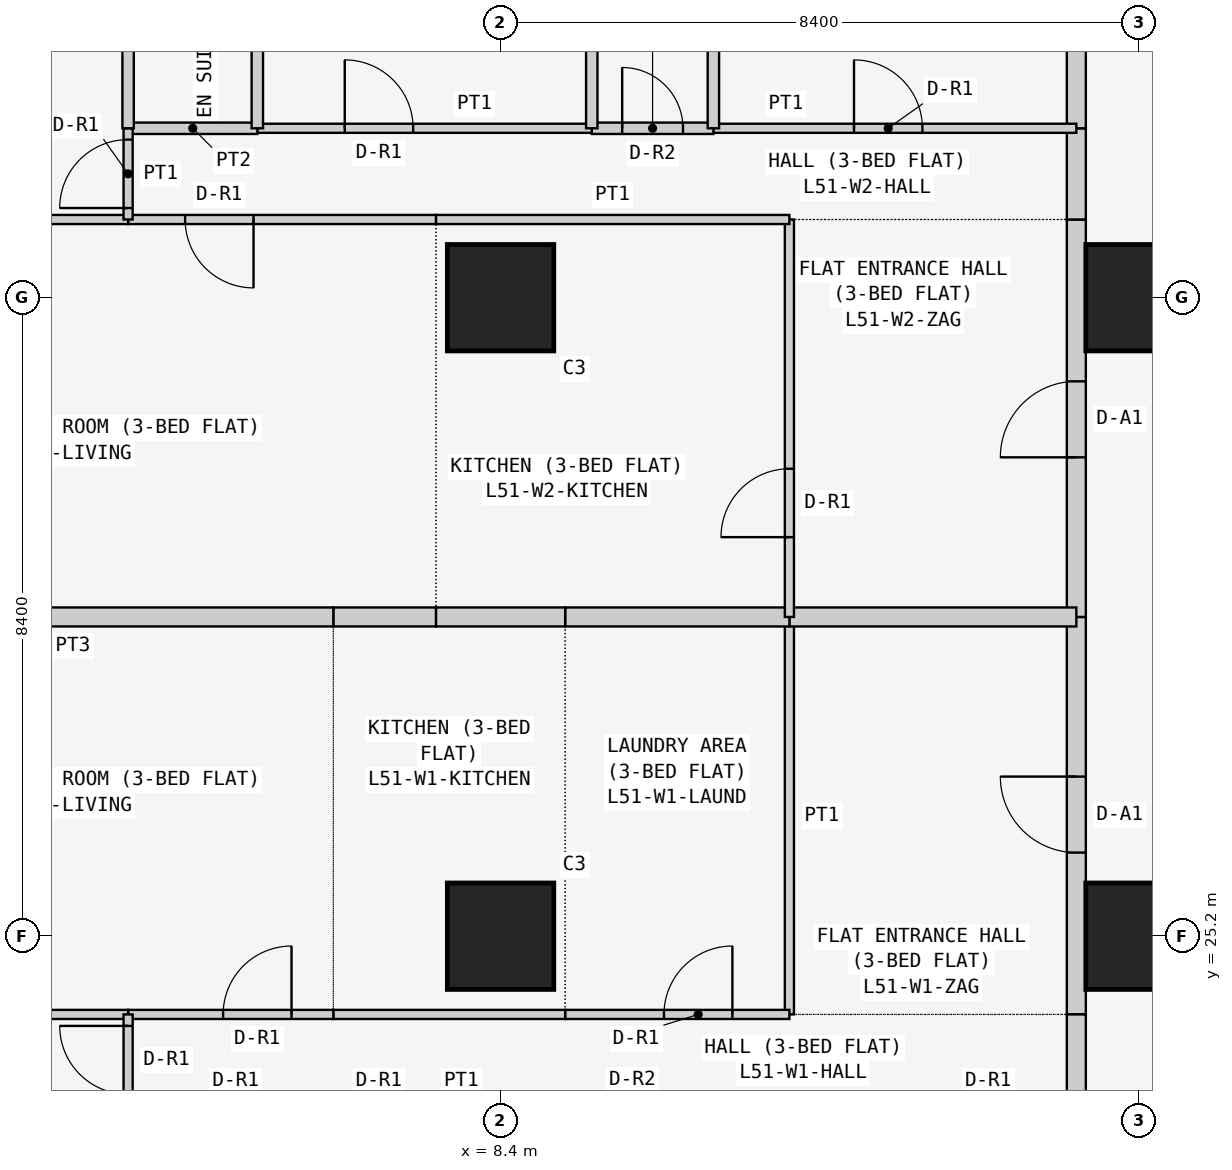
"""IFC4 building model, lengths in metres.
Left out: names, types, materials, properties, quantities, classifications, styles, units other than length and angle.
Written with IfcOpenShell. Run it as: python <this file> out.ifc"""

import sys

from ifc_helpers import new_model, si_unit, direction, frame, frame_2d, origin, origin_2d, place, context, subcontext, project, spatial, rectangle, extrude, element, fill, save


model = new_model("IFC4")
c1 = context("Model", 3, precision=1e-05, world=origin(), true_north=direction((0.0, 1.0)))
c2 = subcontext(c1, "Body", "Model", "MODEL_VIEW")
j1 = project(units=[si_unit("LENGTHUNIT", "METRE"), si_unit("PLANEANGLEUNIT", "RADIAN")], contexts=[c1])
p1 = place(None, origin())
s1 = spatial("IfcSite", under=j1, at=p1, CompositionType="ELEMENT")
p2 = place(p1, origin())
s2 = spatial("IfcBuilding", under=s1, at=p2, CompositionType="ELEMENT")
p3 = place(p2, frame((0.0, 0.0, 197.7)))
s3 = spatial("IfcBuildingStorey", under=s2, at=p3, CompositionType="ELEMENT", Elevation=197.7)
for number, where, z_axis, x_axis in (
    (1, (8.4, 25.2, 0.0), (0.0, 0.0, 1.0), (1.0, 0.0, 0.0)),
    (2, (8.4, 33.6, 0.0), (0.0, 0.0, 1.0), (1.0, 0.0, 0.0)),
    (3, (16.8, 25.2, 0.0), (0.0, 0.0, 1.0), (1.0, 0.0, 0.0)),
    (4, (16.8, 33.6, 0.0), (0.0, 0.0, 1.0), (1.0, 0.0, 0.0)),
):
    element("IfcColumn", number, at=place(p3, frame(where, z_axis=z_axis, x_axis=x_axis)), inside=s3, PredefinedType="COLUMN", context=c2, shape_type="SweptSolid", body=[
        extrude(rectangle(XDim=1.4, YDim=1.4, at=origin_2d()), origin(), (0.0, 0.0, 1.0), 3.6),
    ])
p4 = place(p3, frame((15.975, 24.171, 0.0), z_axis=(0.0, 0.0, 1.0), x_axis=(0.0, 1.0, 0.0)))
e5 = element("IfcWall", 5, at=p4, inside=s3, PredefinedType="PARTITIONING", context=c2, shape_type="SweptSolid", body=[
    extrude(rectangle(XDim=5.229, YDim=0.25, at=frame_2d((2.615, 0.0))), origin(), (0.0, 0.0, 1.0), 3.45),
])
p5 = place(p4, frame((2.129, 0.0, 0.0)))
e6 = element("IfcOpeningElement", 6, at=p5, cuts=e5, PredefinedType="OPENING", context=c2, shape_type="SweptSolid", body=[
    extrude(rectangle(XDim=1.0, YDim=2.1, at=frame_2d((0.5, 1.05))), frame((0.0, 0.135, 0.0), z_axis=(0.0, -1.0, 0.0), x_axis=(1.0, 0.0, 0.0)), (0.0, 0.0, 1.0), 0.27),
])
p6 = place(p3, frame((15.975, 22.971, 0.0), z_axis=(0.0, 0.0, 1.0), x_axis=(0.0, 1.0, 0.0)))
e7 = element("IfcWall", 7, at=p6, inside=s3, PredefinedType="PARTITIONING", context=c2, shape_type="SweptSolid", body=[
    extrude(rectangle(XDim=1.2, YDim=0.25, at=frame_2d((0.6, 0.0))), origin(), (0.0, 0.0, 1.0), 3.45),
])
p7 = place(p3, frame((15.975, 29.4, 0.0), z_axis=(0.0, 0.0, 1.0), x_axis=(0.0, 1.0, 0.0)))
e8 = element("IfcWall", 8, at=p7, inside=s3, PredefinedType="PARTITIONING", context=c2, shape_type="SweptSolid", body=[
    extrude(rectangle(XDim=5.229, YDim=0.25, at=frame_2d((2.615, 0.0))), origin(), (0.0, 0.0, 1.0), 3.45),
])
p8 = place(p7, frame((2.1, 0.0, 0.0)))
e9 = element("IfcOpeningElement", 9, at=p8, cuts=e8, PredefinedType="OPENING", context=c2, shape_type="SweptSolid", body=[
    extrude(rectangle(XDim=1.0, YDim=2.1, at=frame_2d((0.5, 1.05))), frame((0.0, 0.135, 0.0), z_axis=(0.0, -1.0, 0.0), x_axis=(1.0, 0.0, 0.0)), (0.0, 0.0, 1.0), 0.27),
])
p9 = place(p3, frame((15.975, 34.629, 0.0), z_axis=(0.0, 0.0, 1.0), x_axis=(0.0, 1.0, 0.0)))
e10 = element("IfcWall", 10, at=p9, inside=s3, PredefinedType="PARTITIONING", context=c2, shape_type="SweptSolid", body=[
    extrude(rectangle(XDim=1.2, YDim=0.25, at=frame_2d((0.6, 0.0))), origin(), (0.0, 0.0, 1.0), 3.45),
])
p10 = place(p3, frame((15.975, 35.829, 0.0), z_axis=(0.0, 0.0, 1.0), x_axis=(0.0, 1.0, 0.0)))
e11 = element("IfcWall", 11, at=p10, inside=s3, PredefinedType="PARTITIONING", context=c2, shape_type="SweptSolid", body=[
    extrude(rectangle(XDim=6.871, YDim=0.25, at=frame_2d((3.436, 0.0))), origin(), (0.0, 0.0, 1.0), 3.45),
])
p11 = place(p3, frame((12.2, 29.4, 0.0), z_axis=(0.0, 0.0, 1.0), x_axis=(0.0, -1.0, 0.0)))
e12 = element("IfcWall", 12, at=p11, inside=s3, PredefinedType="PARTITIONING", context=c2, shape_type="SweptSolid", body=[
    extrude(rectangle(XDim=5.229, YDim=0.12, at=frame_2d((2.615, 0.0))), origin(), (0.0, 0.0, 1.0), 3.45),
])
p12 = place(p3, frame((15.975, 29.4, 0.0), z_axis=(0.0, 0.0, 1.0), x_axis=(-1.0, 0.0, 0.0)))
e13 = element("IfcWall", 13, at=p12, inside=s3, PredefinedType="PARTITIONING", context=c2, shape_type="SweptSolid", body=[
    extrude(rectangle(XDim=3.775, YDim=0.25, at=frame_2d((1.888, 0.0))), origin(), (0.0, 0.0, 1.0), 3.45),
])
p13 = place(p3, frame((9.25, 24.171, 0.0), z_axis=(0.0, 0.0, 1.0), x_axis=(1.0, 0.0, 0.0)))
e14 = element("IfcWall", 14, at=p13, inside=s3, PredefinedType="PARTITIONING", context=c2, shape_type="SweptSolid", body=[
    extrude(rectangle(XDim=2.95, YDim=0.12, at=frame_2d((1.475, 0.0))), origin(), (0.0, 0.0, 1.0), 3.45),
])
p14 = place(p13, frame((1.3, 0.0, 0.0)))
e15 = element("IfcOpeningElement", 15, at=p14, cuts=e14, PredefinedType="OPENING", context=c2, shape_type="SweptSolid", body=[
    extrude(rectangle(XDim=0.9, YDim=2.1, at=frame_2d((0.45, 1.05))), frame((0.0, 0.07, 0.0), z_axis=(0.0, -1.0, 0.0), x_axis=(1.0, 0.0, 0.0)), (0.0, 0.0, 1.0), 0.14),
])
p15 = place(p3, frame((12.2, 29.4, 0.0), z_axis=(0.0, 0.0, 1.0), x_axis=(-1.0, 0.0, 0.0)))
e16 = element("IfcWall", 16, at=p15, inside=s3, PredefinedType="PARTITIONING", context=c2, shape_type="SweptSolid", body=[
    extrude(rectangle(XDim=2.95, YDim=0.25, at=frame_2d((1.475, 0.0))), origin(), (0.0, 0.0, 1.0), 3.45),
])
p16 = place(p3, frame((6.2, 24.171, 0.0), z_axis=(0.0, 0.0, 1.0), x_axis=(1.0, 0.0, 0.0)))
e17 = element("IfcWall", 17, at=p16, inside=s3, PredefinedType="PARTITIONING", context=c2, shape_type="SweptSolid", body=[
    extrude(rectangle(XDim=3.05, YDim=0.12, at=frame_2d((1.525, 0.0))), origin(), (0.0, 0.0, 1.0), 3.45),
])
p17 = place(p3, frame((9.25, 29.4, 0.0), z_axis=(0.0, 0.0, 1.0), x_axis=(-1.0, 0.0, 0.0)))
e18 = element("IfcWall", 18, at=p17, inside=s3, PredefinedType="PARTITIONING", context=c2, shape_type="SweptSolid", body=[
    extrude(rectangle(XDim=1.7, YDim=0.25, at=frame_2d((0.85, 0.0))), origin(), (0.0, 0.0, 1.0), 3.45),
])
p18 = place(p3, frame((7.55, 29.4, 0.0), z_axis=(0.0, 0.0, 1.0), x_axis=(-1.0, 0.0, 0.0)))
e19 = element("IfcWall", 19, at=p18, inside=s3, PredefinedType="PARTITIONING", context=c2, shape_type="SweptSolid", body=[
    extrude(rectangle(XDim=1.35, YDim=0.25, at=frame_2d((0.675, 0.0))), origin(), (0.0, 0.0, 1.0), 3.45),
])
p19 = place(p3, frame((3.5, 24.171, 0.0), z_axis=(0.0, 0.0, 1.0), x_axis=(1.0, 0.0, 0.0)))
e20 = element("IfcWall", 20, at=p19, inside=s3, PredefinedType="PARTITIONING", context=c2, shape_type="SweptSolid", body=[
    extrude(rectangle(XDim=2.7, YDim=0.12, at=frame_2d((1.35, 0.0))), origin(), (0.0, 0.0, 1.0), 3.45),
])
p20 = place(p19, frame((1.25, 0.0, 0.0)))
e21 = element("IfcOpeningElement", 21, at=p20, cuts=e20, PredefinedType="OPENING", context=c2, shape_type="SweptSolid", body=[
    extrude(rectangle(XDim=0.9, YDim=2.1, at=frame_2d((0.45, 1.05))), frame((0.0, 0.07, 0.0), z_axis=(0.0, -1.0, 0.0), x_axis=(1.0, 0.0, 0.0)), (0.0, 0.0, 1.0), 0.14),
])
p21 = place(p3, frame((-0.65, 24.171, 0.0), z_axis=(0.0, 0.0, 1.0), x_axis=(1.0, 0.0, 0.0)))
e22 = element("IfcWall", 22, at=p21, inside=s3, PredefinedType="PARTITIONING", context=c2, shape_type="SweptSolid", body=[
    extrude(rectangle(XDim=4.15, YDim=0.12, at=frame_2d((2.075, 0.0))), origin(), (0.0, 0.0, 1.0), 3.45),
])
p22 = place(p3, frame((6.2, 29.4, 0.0), z_axis=(0.0, 0.0, 1.0), x_axis=(-1.0, 0.0, 0.0)))
e23 = element("IfcWall", 23, at=p22, inside=s3, PredefinedType="PARTITIONING", context=c2, shape_type="SweptSolid", body=[
    extrude(rectangle(XDim=6.85, YDim=0.25, at=frame_2d((3.425, 0.0))), origin(), (0.0, 0.0, 1.0), 3.45),
])
p23 = place(p3, frame((3.5, 24.171, 0.0), z_axis=(0.0, 0.0, 1.0), x_axis=(0.0, -1.0, 0.0)))
e24 = element("IfcWall", 24, at=p23, inside=s3, PredefinedType="PARTITIONING", context=c2, shape_type="SweptSolid", body=[
    extrude(rectangle(XDim=1.2, YDim=0.12, at=frame_2d((0.6, 0.0))), origin(), (0.0, 0.0, 1.0), 3.45),
])
p24 = place(p23, frame((0.151, 0.0, 0.0)))
e25 = element("IfcOpeningElement", 25, at=p24, cuts=e24, PredefinedType="OPENING", context=c2, shape_type="SweptSolid", body=[
    extrude(rectangle(XDim=0.9, YDim=2.1, at=frame_2d((0.45, 1.05))), frame((0.0, 0.07, 0.0), z_axis=(0.0, -1.0, 0.0), x_axis=(1.0, 0.0, 0.0)), (0.0, 0.0, 1.0), 0.14),
])
p25 = place(p3, frame((12.2, 29.4, 0.0), z_axis=(0.0, 0.0, 1.0), x_axis=(0.0, 1.0, 0.0)))
e26 = element("IfcWall", 26, at=p25, inside=s3, PredefinedType="PARTITIONING", context=c2, shape_type="SweptSolid", body=[
    extrude(rectangle(XDim=5.229, YDim=0.12, at=frame_2d((2.615, 0.0))), origin(), (0.0, 0.0, 1.0), 3.45),
])
p26 = place(p25, frame((1.05, 0.0, 0.0)))
e27 = element("IfcOpeningElement", 27, at=p26, cuts=e26, PredefinedType="OPENING", context=c2, shape_type="SweptSolid", body=[
    extrude(rectangle(XDim=0.9, YDim=2.1, at=frame_2d((0.45, 1.05))), frame((0.0, 0.07, 0.0), z_axis=(0.0, -1.0, 0.0), x_axis=(1.0, 0.0, 0.0)), (0.0, 0.0, 1.0), 0.14),
])
p27 = place(p3, frame((7.55, 34.629, 0.0), z_axis=(0.0, 0.0, 1.0), x_axis=(1.0, 0.0, 0.0)))
e28 = element("IfcWall", 28, at=p27, inside=s3, PredefinedType="PARTITIONING", context=c2, shape_type="SweptSolid", body=[
    extrude(rectangle(XDim=4.65, YDim=0.12, at=frame_2d((2.325, 0.0))), origin(), (0.0, 0.0, 1.0), 3.45),
])
p28 = place(p3, frame((3.5, 34.629, 0.0), z_axis=(0.0, 0.0, 1.0), x_axis=(1.0, 0.0, 0.0)))
e29 = element("IfcWall", 29, at=p28, inside=s3, PredefinedType="PARTITIONING", context=c2, shape_type="SweptSolid", body=[
    extrude(rectangle(XDim=4.05, YDim=0.12, at=frame_2d((2.025, 0.0))), origin(), (0.0, 0.0, 1.0), 3.45),
])
p29 = place(p28, frame((0.75, 0.0, 0.0)))
e30 = element("IfcOpeningElement", 30, at=p29, cuts=e29, PredefinedType="OPENING", context=c2, shape_type="SweptSolid", body=[
    extrude(rectangle(XDim=0.9, YDim=2.1, at=frame_2d((0.45, 1.05))), frame((0.0, 0.07, 0.0), z_axis=(0.0, -1.0, 0.0), x_axis=(1.0, 0.0, 0.0)), (0.0, 0.0, 1.0), 0.14),
])
p30 = place(p3, frame((-0.65, 34.629, 0.0), z_axis=(0.0, 0.0, 1.0), x_axis=(1.0, 0.0, 0.0)))
e31 = element("IfcWall", 31, at=p30, inside=s3, PredefinedType="PARTITIONING", context=c2, shape_type="SweptSolid", body=[
    extrude(rectangle(XDim=4.15, YDim=0.12, at=frame_2d((2.075, 0.0))), origin(), (0.0, 0.0, 1.0), 3.45),
])
p31 = place(p3, frame((11.2, 35.829, 0.0), z_axis=(0.0, 0.0, 1.0), x_axis=(1.0, 0.0, 0.0)))
e32 = element("IfcWall", 32, at=p31, inside=s3, PredefinedType="PARTITIONING", context=c2, shape_type="SweptSolid", body=[
    extrude(rectangle(XDim=4.775, YDim=0.12, at=frame_2d((2.388, 0.0))), origin(), (0.0, 0.0, 1.0), 3.45),
])
p32 = place(p31, frame((1.85, 0.0, 0.0)))
e33 = element("IfcOpeningElement", 33, at=p32, cuts=e32, PredefinedType="OPENING", context=c2, shape_type="SweptSolid", body=[
    extrude(rectangle(XDim=0.9, YDim=2.1, at=frame_2d((0.45, 1.05))), frame((0.0, 0.07, 0.0), z_axis=(0.0, -1.0, 0.0), x_axis=(1.0, 0.0, 0.0)), (0.0, 0.0, 1.0), 0.14),
])
p33 = place(p3, frame((9.6, 35.829, 0.0), z_axis=(0.0, 0.0, 1.0), x_axis=(1.0, 0.0, 0.0)))
e34 = element("IfcWall", 34, at=p33, inside=s3, PredefinedType="PARTITIONING", context=c2, shape_type="SweptSolid", body=[
    extrude(rectangle(XDim=1.6, YDim=0.15, at=frame_2d((0.8, 0.0))), origin(), (0.0, 0.0, 1.0), 3.45),
])
p34 = place(p33, frame((0.4, 0.0, 0.0)))
e35 = element("IfcOpeningElement", 35, at=p34, cuts=e34, PredefinedType="OPENING", context=c2, shape_type="SweptSolid", body=[
    extrude(rectangle(XDim=0.8, YDim=2.1, at=frame_2d((0.4, 1.05))), frame((0.0, 0.085, 0.0), z_axis=(0.0, -1.0, 0.0), x_axis=(1.0, 0.0, 0.0)), (0.0, 0.0, 1.0), 0.17),
])
p35 = place(p3, frame((5.2, 35.829, 0.0), z_axis=(0.0, 0.0, 1.0), x_axis=(1.0, 0.0, 0.0)))
e36 = element("IfcWall", 36, at=p35, inside=s3, PredefinedType="PARTITIONING", context=c2, shape_type="SweptSolid", body=[
    extrude(rectangle(XDim=4.4, YDim=0.12, at=frame_2d((2.2, 0.0))), origin(), (0.0, 0.0, 1.0), 3.45),
])
p36 = place(p35, frame((1.15, 0.0, 0.0)))
e37 = element("IfcOpeningElement", 37, at=p36, cuts=e36, PredefinedType="OPENING", context=c2, shape_type="SweptSolid", body=[
    extrude(rectangle(XDim=0.9, YDim=2.1, at=frame_2d((0.45, 1.05))), frame((0.0, 0.07, 0.0), z_axis=(0.0, -1.0, 0.0), x_axis=(1.0, 0.0, 0.0)), (0.0, 0.0, 1.0), 0.14),
])
p37 = place(p3, frame((3.5, 35.829, 0.0), z_axis=(0.0, 0.0, 1.0), x_axis=(1.0, 0.0, 0.0)))
e38 = element("IfcWall", 38, at=p37, inside=s3, PredefinedType="PARTITIONING", context=c2, shape_type="SweptSolid", body=[
    extrude(rectangle(XDim=1.7, YDim=0.15, at=frame_2d((0.85, 0.0))), origin(), (0.0, 0.0, 1.0), 3.45),
])
p38 = place(p3, frame((3.5, 34.629, 0.0), z_axis=(0.0, 0.0, 1.0), x_axis=(0.0, 1.0, 0.0)))
e39 = element("IfcWall", 39, at=p38, inside=s3, PredefinedType="PARTITIONING", context=c2, shape_type="SweptSolid", body=[
    extrude(rectangle(XDim=1.2, YDim=0.12, at=frame_2d((0.6, 0.0))), origin(), (0.0, 0.0, 1.0), 3.45),
])
p39 = place(p38, frame((0.151, 0.0, 0.0)))
e40 = element("IfcOpeningElement", 40, at=p39, cuts=e39, PredefinedType="OPENING", context=c2, shape_type="SweptSolid", body=[
    extrude(rectangle(XDim=0.9, YDim=2.1, at=frame_2d((0.45, 1.05))), frame((0.0, 0.07, 0.0), z_axis=(0.0, -1.0, 0.0), x_axis=(1.0, 0.0, 0.0)), (0.0, 0.0, 1.0), 0.14),
])
for number, where, z_axis, x_axis in (
    (41, (11.2, 35.829, 0.0), (0.0, 0.0, 1.0), (0.0, 1.0, 0.0)),
    (42, (9.6, 35.829, 0.0), (0.0, 0.0, 1.0), (0.0, 1.0, 0.0)),
    (43, (5.2, 35.829, 0.0), (0.0, 0.0, 1.0), (0.0, 1.0, 0.0)),
):
    element("IfcWall", number, at=place(p3, frame(where, z_axis=z_axis, x_axis=x_axis)), inside=s3, PredefinedType="PARTITIONING", context=c2, shape_type="SweptSolid", body=[
        extrude(rectangle(XDim=6.871, YDim=0.15, at=frame_2d((3.436, 0.0))), origin(), (0.0, 0.0, 1.0), 3.45),
    ])
p40 = place(p3, frame((3.5, 35.829, 0.0), z_axis=(0.0, 0.0, 1.0), x_axis=(0.0, 1.0, 0.0)))
e44 = element("IfcWall", 44, at=p40, inside=s3, PredefinedType="PARTITIONING", context=c2, shape_type="SweptSolid", body=[
    extrude(rectangle(XDim=6.871, YDim=0.15, at=frame_2d((3.436, 0.0))), origin(), (0.0, 0.0, 1.0), 3.45),
])
p41 = place(p40, frame((3.171, 0.0, 0.0)))
e45 = element("IfcOpeningElement", 45, at=p41, cuts=e44, PredefinedType="OPENING", context=c2, shape_type="SweptSolid", body=[
    extrude(rectangle(XDim=0.8, YDim=2.1, at=frame_2d((0.4, 1.05))), frame((0.0, 0.085, 0.0), z_axis=(0.0, -1.0, 0.0), x_axis=(1.0, 0.0, 0.0)), (0.0, 0.0, 1.0), 0.17),
])
p42 = place(p5, origin())
e46 = element("IfcDoor", 46, at=p42, inside=s3, OperationType="SINGLE_SWING_RIGHT", PredefinedType="DOOR", context=c2, shape_type="SweptSolid", body=[
    extrude(rectangle(XDim=1.0, YDim=2.1, at=frame_2d((0.5, 1.05))), frame((0.0, 0.025, 0.0), z_axis=(0.0, -1.0, 0.0), x_axis=(1.0, 0.0, 0.0)), (0.0, 0.0, 1.0), 0.05),
])
fill(e6, e46)
p43 = place(p14, origin())
e47 = element("IfcDoor", 47, at=p43, inside=s3, OperationType="SINGLE_SWING_RIGHT", PredefinedType="DOOR", context=c2, shape_type="SweptSolid", body=[
    extrude(rectangle(XDim=0.9, YDim=2.1, at=frame_2d((0.45, 1.05))), frame((0.0, 0.025, 0.0), z_axis=(0.0, -1.0, 0.0), x_axis=(1.0, 0.0, 0.0)), (0.0, 0.0, 1.0), 0.05),
])
fill(e15, e47)
p44 = place(p20, origin())
e48 = element("IfcDoor", 48, at=p44, inside=s3, OperationType="SINGLE_SWING_RIGHT", PredefinedType="DOOR", context=c2, shape_type="SweptSolid", body=[
    extrude(rectangle(XDim=0.9, YDim=2.1, at=frame_2d((0.45, 1.05))), frame((0.0, 0.025, 0.0), z_axis=(0.0, -1.0, 0.0), x_axis=(1.0, 0.0, 0.0)), (0.0, 0.0, 1.0), 0.05),
])
fill(e21, e48)
p45 = place(p24, frame((0.9, 0.0, 0.0), z_axis=(0.0, 0.0, 1.0), x_axis=(-1.0, 0.0, 0.0)))
e49 = element("IfcDoor", 49, at=p45, inside=s3, OperationType="SINGLE_SWING_RIGHT", PredefinedType="DOOR", context=c2, shape_type="SweptSolid", body=[
    extrude(rectangle(XDim=0.9, YDim=2.1, at=frame_2d((0.45, 1.05))), frame((0.0, 0.025, 0.0), z_axis=(0.0, -1.0, 0.0), x_axis=(1.0, 0.0, 0.0)), (0.0, 0.0, 1.0), 0.05),
])
fill(e25, e49)
p46 = place(p8, origin())
e50 = element("IfcDoor", 50, at=p46, inside=s3, OperationType="SINGLE_SWING_LEFT", PredefinedType="DOOR", context=c2, shape_type="SweptSolid", body=[
    extrude(rectangle(XDim=1.0, YDim=2.1, at=frame_2d((0.5, 1.05))), frame((0.0, 0.025, 0.0), z_axis=(0.0, -1.0, 0.0), x_axis=(1.0, 0.0, 0.0)), (0.0, 0.0, 1.0), 0.05),
])
fill(e9, e50)
p47 = place(p26, origin())
e51 = element("IfcDoor", 51, at=p47, inside=s3, OperationType="SINGLE_SWING_LEFT", PredefinedType="DOOR", context=c2, shape_type="SweptSolid", body=[
    extrude(rectangle(XDim=0.9, YDim=2.1, at=frame_2d((0.45, 1.05))), frame((0.0, 0.025, 0.0), z_axis=(0.0, -1.0, 0.0), x_axis=(1.0, 0.0, 0.0)), (0.0, 0.0, 1.0), 0.05),
])
fill(e27, e51)
p48 = place(p29, frame((0.9, 0.0, 0.0), z_axis=(0.0, 0.0, 1.0), x_axis=(-1.0, 0.0, 0.0)))
e52 = element("IfcDoor", 52, at=p48, inside=s3, OperationType="SINGLE_SWING_LEFT", PredefinedType="DOOR", context=c2, shape_type="SweptSolid", body=[
    extrude(rectangle(XDim=0.9, YDim=2.1, at=frame_2d((0.45, 1.05))), frame((0.0, 0.025, 0.0), z_axis=(0.0, -1.0, 0.0), x_axis=(1.0, 0.0, 0.0)), (0.0, 0.0, 1.0), 0.05),
])
fill(e30, e52)
p49 = place(p32, origin())
e53 = element("IfcDoor", 53, at=p49, inside=s3, OperationType="SINGLE_SWING_LEFT", PredefinedType="DOOR", context=c2, shape_type="SweptSolid", body=[
    extrude(rectangle(XDim=0.9, YDim=2.1, at=frame_2d((0.45, 1.05))), frame((0.0, 0.025, 0.0), z_axis=(0.0, -1.0, 0.0), x_axis=(1.0, 0.0, 0.0)), (0.0, 0.0, 1.0), 0.05),
])
fill(e33, e53)
p50 = place(p34, origin())
e54 = element("IfcDoor", 54, at=p50, inside=s3, OperationType="SINGLE_SWING_LEFT", PredefinedType="DOOR", context=c2, shape_type="SweptSolid", body=[
    extrude(rectangle(XDim=0.8, YDim=2.1, at=frame_2d((0.4, 1.05))), frame((0.0, 0.025, 0.0), z_axis=(0.0, -1.0, 0.0), x_axis=(1.0, 0.0, 0.0)), (0.0, 0.0, 1.0), 0.05),
])
fill(e35, e54)
p51 = place(p36, origin())
e55 = element("IfcDoor", 55, at=p51, inside=s3, OperationType="SINGLE_SWING_LEFT", PredefinedType="DOOR", context=c2, shape_type="SweptSolid", body=[
    extrude(rectangle(XDim=0.9, YDim=2.1, at=frame_2d((0.45, 1.05))), frame((0.0, 0.025, 0.0), z_axis=(0.0, -1.0, 0.0), x_axis=(1.0, 0.0, 0.0)), (0.0, 0.0, 1.0), 0.05),
])
fill(e37, e55)
p52 = place(p39, origin())
e56 = element("IfcDoor", 56, at=p52, inside=s3, OperationType="SINGLE_SWING_LEFT", PredefinedType="DOOR", context=c2, shape_type="SweptSolid", body=[
    extrude(rectangle(XDim=0.9, YDim=2.1, at=frame_2d((0.45, 1.05))), frame((0.0, 0.025, 0.0), z_axis=(0.0, -1.0, 0.0), x_axis=(1.0, 0.0, 0.0)), (0.0, 0.0, 1.0), 0.05),
])
fill(e40, e56)
save(model, sys.argv[1])
